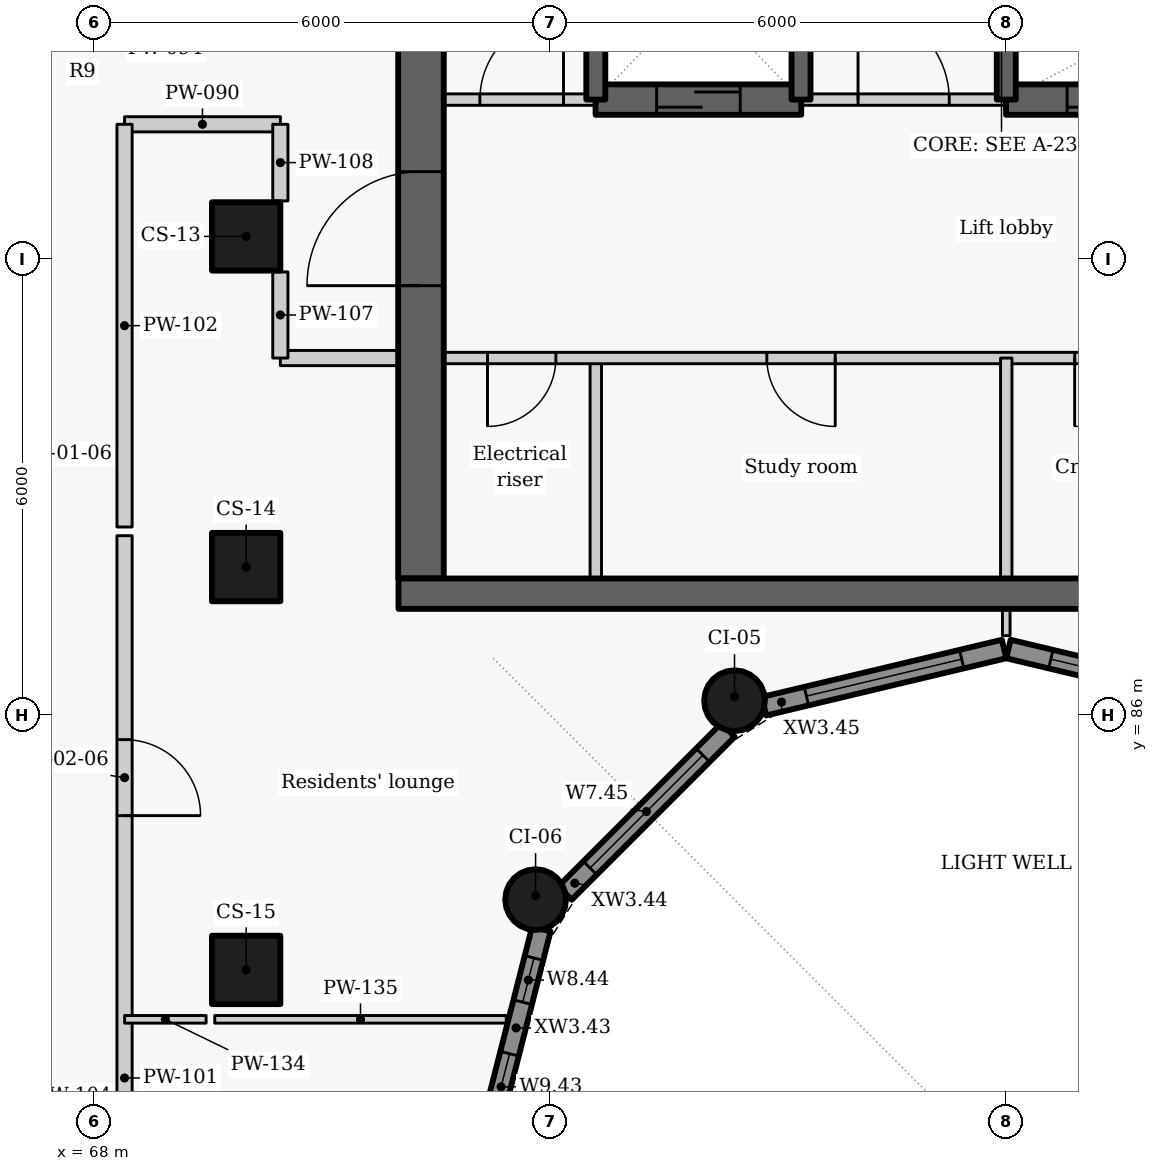
"""IFC4 building model, lengths in metres.
Left out: names, types, materials, properties, quantities, classifications, styles, units other than length and angle.
Written with IfcOpenShell. Run it as: python <this file> out.ifc"""

import sys

from ifc_helpers import new_model, si_unit, direction, frame, frame_2d, origin, origin_2d, place, context, subcontext, project, spatial, rectangle, circle, extrude, element, fill, save


model = new_model("IFC4")
c1 = context("Model", 3, precision=1e-05, world=origin(), true_north=direction((0.0, 1.0)))
c2 = subcontext(c1, "Body", "Model", "MODEL_VIEW")
j1 = project(units=[si_unit("LENGTHUNIT", "METRE"), si_unit("PLANEANGLEUNIT", "RADIAN")], contexts=[c1])
p1 = place(None, origin())
s1 = spatial("IfcSite", under=j1, at=p1, CompositionType="ELEMENT")
p2 = place(p1, origin())
s2 = spatial("IfcBuilding", under=s1, at=p2, CompositionType="ELEMENT")
p3 = place(p2, frame((0.0, 0.0, 176.7)))
s3 = spatial("IfcBuildingStorey", under=s2, at=p3, CompositionType="ELEMENT", Elevation=176.7)
for number, where, z_axis, x_axis in (
    (1, (70.0, 92.3, 0.0), (0.0, 0.0, 1.0), (0.0, -1.0, 0.0)),
    (2, (70.0, 87.95, 0.0), (0.0, 0.0, 1.0), (0.0, -1.0, 0.0)),
    (3, (70.0, 82.65, 0.0), (0.0, 0.0, 1.0), (0.0, -1.0, 0.0)),
):
    element("IfcColumn", number, at=place(p3, frame(where, z_axis=z_axis, x_axis=x_axis)), inside=s3, PredefinedType="COLUMN", context=c2, shape_type="SweptSolid", body=[
        extrude(rectangle(XDim=0.9, YDim=0.9, at=origin_2d()), origin(), (0.0, 0.0, 1.0), 3.3),
    ])
for number, where, z_axis, x_axis in (
    (4, (76.425, 86.192, 0.0), (0.0, 0.0, 1.0), (-0.866, -0.5, 0.0)),
    (5, (73.808, 83.575, 0.0), (0.0, 0.0, 1.0), (-0.5, -0.866, 0.0)),
):
    element("IfcColumn", number, at=place(p3, frame(where, z_axis=z_axis, x_axis=x_axis)), inside=s3, PredefinedType="COLUMN", context=c2, shape_type="SweptSolid", body=[
        extrude(circle(Radius=0.4, at=origin_2d()), origin(), (0.0, 0.0, 1.0), 3.3),
    ])
p4 = place(p3, frame((73.14, 80.27, 0.0), z_axis=(0.0, 0.0, 1.0), x_axis=(0.247055971283, 0.969001211069, 0.0)))
e6 = element("IfcWall", 6, at=p4, inside=s3, PredefinedType="SOLIDWALL", context=c2, shape_type="SweptSolid", body=[
    extrude(rectangle(XDim=3.01, YDim=0.25, at=frame_2d((1.505, 0.0))), origin(), (0.0, 0.0, 1.0), 2.425),
])
p5 = place(p4, frame((0.419, 0.0, 0.9)))
e7 = element("IfcOpeningElement", 7, at=p5, cuts=e6, PredefinedType="OPENING", context=c2, shape_type="SweptSolid", body=[
    extrude(rectangle(XDim=0.9, YDim=1.1, at=frame_2d((0.45, 0.55))), frame((0.0, 0.135, 0.0), z_axis=(0.0, -1.0, 0.0), x_axis=(1.0, 0.0, 0.0)), (0.0, 0.0, 1.0), 0.27),
])
p6 = place(p4, frame((2.018, 0.0, 0.9)))
e8 = element("IfcOpeningElement", 8, at=p6, cuts=e6, PredefinedType="OPENING", context=c2, shape_type="SweptSolid", body=[
    extrude(rectangle(XDim=0.6, YDim=1.1, at=frame_2d((0.3, 0.55))), frame((0.0, 0.135, 0.0), z_axis=(0.0, -1.0, 0.0), x_axis=(1.0, 0.0, 0.0)), (0.0, 0.0, 1.0), 0.27),
])
p7 = place(p3, frame((74.194, 83.661, 0.0), z_axis=(0.0, 0.0, 1.0), x_axis=(0.707106781187, 0.707106781187, 0.0)))
e9 = element("IfcWall", 9, at=p7, inside=s3, PredefinedType="SOLIDWALL", context=c2, shape_type="SweptSolid", body=[
    extrude(rectangle(XDim=3.033, YDim=0.25, at=frame_2d((1.517, 0.0))), origin(), (0.0, 0.0, 1.0), 2.425),
])
p8 = place(p7, frame((0.467, 0.0, 0.9)))
e10 = element("IfcOpeningElement", 10, at=p8, cuts=e9, PredefinedType="OPENING", context=c2, shape_type="SweptSolid", body=[
    extrude(rectangle(XDim=2.1, YDim=1.1, at=frame_2d((1.05, 0.55))), frame((0.0, 0.135, 0.0), z_axis=(0.0, -1.0, 0.0), x_axis=(1.0, 0.0, 0.0)), (0.0, 0.0, 1.0), 0.27),
])
p9 = place(p3, frame((76.814, 86.119, 0.0), z_axis=(0.0, 0.0, 1.0), x_axis=(0.972773113459, 0.231759508395, 0.0)))
e11 = element("IfcWall", 11, at=p9, inside=s3, PredefinedType="SOLIDWALL", context=c2, shape_type="SweptSolid", body=[
    extrude(rectangle(XDim=3.246, YDim=0.25, at=frame_2d((1.623, 0.0))), origin(), (0.0, 0.0, 1.0), 2.425),
])
p10 = place(p9, frame((0.573, 0.0, 0.9)))
e12 = element("IfcOpeningElement", 12, at=p10, cuts=e11, PredefinedType="OPENING", context=c2, shape_type="SweptSolid", body=[
    extrude(rectangle(XDim=2.1, YDim=1.1, at=frame_2d((1.05, 0.55))), frame((0.0, 0.135, 0.0), z_axis=(0.0, -1.0, 0.0), x_axis=(1.0, 0.0, 0.0)), (0.0, 0.0, 1.0), 0.27),
])
p11 = place(p3, frame((80.029, 86.872, 0.0), z_axis=(0.0, 0.0, 1.0), x_axis=(0.972773113459, -0.231759508395, 0.0)))
e13 = element("IfcWall", 13, at=p11, inside=s3, PredefinedType="SOLIDWALL", context=c2, shape_type="SweptSolid", body=[
    extrude(rectangle(XDim=3.246, YDim=0.25, at=frame_2d((1.623, 0.0))), origin(), (0.0, 0.0, 1.0), 2.425),
])
p12 = place(p11, frame((0.573, 0.0, 0.9)))
e14 = element("IfcOpeningElement", 14, at=p12, cuts=e13, PredefinedType="OPENING", context=c2, shape_type="SweptSolid", body=[
    extrude(rectangle(XDim=2.1, YDim=1.1, at=frame_2d((1.05, 0.55))), frame((0.0, 0.135, 0.0), z_axis=(0.0, -1.0, 0.0), x_axis=(1.0, 0.0, 0.0)), (0.0, 0.0, 1.0), 0.27),
])
p13 = place(p3, frame((74.6, 87.8, 0.0), z_axis=(0.0, 0.0, 1.0), x_axis=(0.0, 1.0, 0.0)))
e15 = element("IfcWall", 15, at=p13, inside=s3, PredefinedType="PARTITIONING", context=c2, shape_type="SweptSolid", body=[
    extrude(rectangle(XDim=2.9, YDim=0.15, at=frame_2d((1.45, 0.0))), origin(), (0.0, 0.0, 1.0), 3.025),
])
p14 = place(p3, frame((85.4, 90.7, 0.0), z_axis=(0.0, 0.0, 1.0), x_axis=(-1.0, 0.0, 0.0)))
e16 = element("IfcWall", 16, at=p14, inside=s3, PredefinedType="PARTITIONING", context=c2, shape_type="SweptSolid", body=[
    extrude(rectangle(XDim=13.4, YDim=0.15, at=frame_2d((6.7, 0.0))), origin(), (0.0, 0.0, 1.0), 3.025),
])
p15 = place(p14, frame((11.325, 0.0, 0.0)))
e17 = element("IfcOpeningElement", 17, at=p15, cuts=e16, PredefinedType="OPENING", context=c2, shape_type="SweptSolid", body=[
    extrude(rectangle(XDim=0.9, YDim=2.1, at=frame_2d((0.45, 1.05))), frame((0.0, 0.085, 0.0), z_axis=(0.0, -1.0, 0.0), x_axis=(1.0, 0.0, 0.0)), (0.0, 0.0, 1.0), 0.17),
])
p16 = place(p14, frame((7.65, 0.0, 0.0)))
e18 = element("IfcOpeningElement", 18, at=p16, cuts=e16, PredefinedType="OPENING", context=c2, shape_type="SweptSolid", body=[
    extrude(rectangle(XDim=0.9, YDim=2.1, at=frame_2d((0.45, 1.05))), frame((0.0, 0.085, 0.0), z_axis=(0.0, -1.0, 0.0), x_axis=(1.0, 0.0, 0.0)), (0.0, 0.0, 1.0), 0.17),
])
p17 = place(p14, frame((3.6, 0.0, 0.0)))
e19 = element("IfcOpeningElement", 19, at=p17, cuts=e16, PredefinedType="OPENING", context=c2, shape_type="SweptSolid", body=[
    extrude(rectangle(XDim=0.9, YDim=2.1, at=frame_2d((0.45, 1.05))), frame((0.0, 0.085, 0.0), z_axis=(0.0, -1.0, 0.0), x_axis=(1.0, 0.0, 0.0)), (0.0, 0.0, 1.0), 0.17),
])
p18 = place(p14, frame((0.9, 0.0, 0.0)))
e20 = element("IfcOpeningElement", 20, at=p18, cuts=e16, PredefinedType="OPENING", context=c2, shape_type="SweptSolid", body=[
    extrude(rectangle(XDim=0.9, YDim=2.1, at=frame_2d((0.45, 1.05))), frame((0.0, 0.085, 0.0), z_axis=(0.0, -1.0, 0.0), x_axis=(1.0, 0.0, 0.0)), (0.0, 0.0, 1.0), 0.17),
])
p19 = place(p3, frame((72.3, 87.8, -0.41), z_axis=(0.0, 0.0, 1.0), x_axis=(0.0, 1.0, 0.0)))
e21 = element("IfcWall", 21, at=p19, inside=s3, PredefinedType="SHEAR", context=c2, shape_type="SweptSolid", body=[
    extrude(rectangle(XDim=9.1, YDim=0.6, at=frame_2d((4.55, 0.0))), origin(), (0.0, 0.0, 1.0), 3.435),
])
p20 = place(p19, frame((3.852, 0.0, 0.41)))
e22 = element("IfcOpeningElement", 22, at=p20, cuts=e21, PredefinedType="OPENING", context=c2, shape_type="SweptSolid", body=[
    extrude(rectangle(XDim=1.5, YDim=2.1, at=frame_2d((0.75, 1.05))), frame((0.0, 0.31, 0.0), z_axis=(0.0, -1.0, 0.0), x_axis=(1.0, 0.0, 0.0)), (0.0, 0.0, 1.0), 0.62),
])
p21 = place(p3, frame((80.0, 87.8, 0.0), z_axis=(0.0, 0.0, 1.0), x_axis=(0.0, 1.0, 0.0)))
e23 = element("IfcWall", 23, at=p21, inside=s3, PredefinedType="PARTITIONING", context=c2, shape_type="SweptSolid", body=[
    extrude(rectangle(XDim=2.9, YDim=0.15, at=frame_2d((1.45, 0.0))), origin(), (0.0, 0.0, 1.0), 3.025),
])
p22 = place(p3, frame((72.0, 94.1, 0.0), z_axis=(0.0, 0.0, 1.0), x_axis=(1.0, 0.0, 0.0)))
e24 = element("IfcWall", 24, at=p22, inside=s3, PredefinedType="PARTITIONING", context=c2, shape_type="SweptSolid", body=[
    extrude(rectangle(XDim=2.603, YDim=0.15, at=frame_2d((1.302, 0.0))), origin(), (0.0, 0.0, 1.0), 3.025),
])
p23 = place(p22, frame((1.075, 0.0, 0.0)))
e25 = element("IfcOpeningElement", 25, at=p23, cuts=e24, PredefinedType="OPENING", context=c2, shape_type="SweptSolid", body=[
    extrude(rectangle(XDim=1.1, YDim=2.1, at=frame_2d((0.55, 1.05))), frame((0.0, 0.085, 0.0), z_axis=(0.0, -1.0, 0.0), x_axis=(1.0, 0.0, 0.0)), (0.0, 0.0, 1.0), 0.17),
])
p24 = place(p3, frame((77.297, 94.1, 0.0), z_axis=(0.0, 0.0, 1.0), x_axis=(1.0, 0.0, 0.0)))
e26 = element("IfcWall", 26, at=p24, inside=s3, PredefinedType="PARTITIONING", context=c2, shape_type="SweptSolid", body=[
    extrude(rectangle(XDim=2.706, YDim=0.15, at=frame_2d((1.353, 0.0))), origin(), (0.0, 0.0, 1.0), 3.025),
])
p25 = place(p24, frame((0.753, 0.0, 0.0)))
e27 = element("IfcOpeningElement", 27, at=p25, cuts=e26, PredefinedType="OPENING", context=c2, shape_type="SweptSolid", body=[
    extrude(rectangle(XDim=1.2, YDim=2.1, at=frame_2d((0.6, 1.05))), frame((0.0, 0.085, 0.0), z_axis=(0.0, -1.0, 0.0), x_axis=(1.0, 0.0, 0.0)), (0.0, 0.0, 1.0), 0.17),
])
p26 = place(p3, frame((74.597, 94.1, -0.41), z_axis=(0.0, 0.0, 1.0), x_axis=(1.0, 0.0, 0.0)))
e28 = element("IfcWall", 28, at=p26, inside=s3, PredefinedType="SHEAR", context=c2, shape_type="SweptSolid", body=[
    extrude(rectangle(XDim=2.706, YDim=0.4, at=frame_2d((1.353, 0.0))), origin(), (0.0, 0.0, 1.0), 3.435),
])
p27 = place(p26, frame((0.803, 0.0, 0.41)))
e29 = element("IfcOpeningElement", 29, at=p27, cuts=e28, PredefinedType="OPENING", context=c2, shape_type="SweptSolid", body=[
    extrude(rectangle(XDim=1.1, YDim=2.1, at=frame_2d((0.55, 1.05))), frame((0.0, 0.21, 0.0), z_axis=(0.0, -1.0, 0.0), x_axis=(1.0, 0.0, 0.0)), (0.0, 0.0, 1.0), 0.42),
])
p28 = place(p3, frame((79.997, 94.1, -0.41), z_axis=(0.0, 0.0, 1.0), x_axis=(1.0, 0.0, 0.0)))
e30 = element("IfcWall", 30, at=p28, inside=s3, PredefinedType="SHEAR", context=c2, shape_type="SweptSolid", body=[
    extrude(rectangle(XDim=5.406, YDim=0.4, at=frame_2d((2.703, 0.0))), origin(), (0.0, 0.0, 1.0), 3.435),
])
p29 = place(p28, frame((0.803, 0.0, 0.41)))
e31 = element("IfcOpeningElement", 31, at=p29, cuts=e30, PredefinedType="OPENING", context=c2, shape_type="SweptSolid", body=[
    extrude(rectangle(XDim=1.1, YDim=2.1, at=frame_2d((0.55, 1.05))), frame((0.0, 0.21, 0.0), z_axis=(0.0, -1.0, 0.0), x_axis=(1.0, 0.0, 0.0)), (0.0, 0.0, 1.0), 0.42),
])
for number, where, z_axis, x_axis in (
    (32, (74.6, 94.1, -0.41), (0.0, 0.0, 1.0), (0.0, 1.0, 0.0)),
    (33, (77.3, 94.1, -0.41), (0.0, 0.0, 1.0), (0.0, 1.0, 0.0)),
    (34, (80.0, 94.1, -0.41), (0.0, 0.0, 1.0), (0.0, 1.0, 0.0)),
):
    element("IfcWall", number, at=place(p3, frame(where, z_axis=z_axis, x_axis=x_axis)), inside=s3, PredefinedType="SHEAR", context=c2, shape_type="SweptSolid", body=[
        extrude(rectangle(XDim=2.8, YDim=0.25, at=frame_2d((1.4, 0.0))), origin(), (0.0, 0.0, 1.0), 3.435),
    ])
p30 = place(p3, frame((68.4, 93.775, 0.0), z_axis=(0.0, 0.0, 1.0), x_axis=(1.0, 0.0, 0.0)))
e35 = element("IfcWall", 35, at=p30, inside=s3, PredefinedType="PARTITIONING", context=c2, shape_type="SweptSolid", body=[
    extrude(rectangle(XDim=2.05, YDim=0.2, at=frame_2d((1.025, 0.0))), origin(), (0.0, 0.0, 1.0), 2.505),
])
p31 = place(p3, frame((70.45, 90.7, 0.0), z_axis=(0.0, 0.0, 1.0), x_axis=(1.0, 0.0, 0.0)))
e36 = element("IfcWall", 36, at=p31, inside=s3, PredefinedType="PARTITIONING", context=c2, shape_type="SweptSolid", body=[
    extrude(rectangle(XDim=1.55, YDim=0.2, at=frame_2d((0.775, 0.0))), origin(), (0.0, 0.0, 1.0), 3.025),
])
p32 = place(p3, frame((68.4, 88.363, 0.0), z_axis=(0.0, 0.0, 1.0), x_axis=(0.0, -1.0, 0.0)))
e37 = element("IfcWall", 37, at=p32, inside=s3, PredefinedType="PARTITIONING", context=c2, shape_type="SweptSolid", body=[
    extrude(rectangle(XDim=10.486, YDim=0.2, at=frame_2d((5.243, 0.0))), origin(), (0.0, 0.0, 1.0), 3.025),
])
p33 = place(p32, frame((2.683, 0.0, 0.0)))
e38 = element("IfcOpeningElement", 38, at=p33, cuts=e37, PredefinedType="OPENING", context=c2, shape_type="SweptSolid", body=[
    extrude(rectangle(XDim=1.0, YDim=2.1, at=frame_2d((0.5, 1.05))), frame((0.0, 0.11, 0.0), z_axis=(0.0, -1.0, 0.0), x_axis=(1.0, 0.0, 0.0)), (0.0, 0.0, 1.0), 0.22),
])
p34 = place(p3, frame((68.4, 88.477, 0.0), z_axis=(0.0, 0.0, 1.0), x_axis=(0.0, 1.0, 0.0)))
e39 = element("IfcWall", 39, at=p34, inside=s3, PredefinedType="PARTITIONING", context=c2, shape_type="SweptSolid", body=[
    extrude(rectangle(XDim=5.298, YDim=0.2, at=frame_2d((2.649, 0.0))), origin(), (0.0, 0.0, 1.0), 3.025),
])
p35 = place(p3, frame((70.45, 90.7, 0.0), z_axis=(0.0, 0.0, 1.0), x_axis=(0.0, 1.0, 0.0)))
e40 = element("IfcWall", 40, at=p35, inside=s3, PredefinedType="PARTITIONING", context=c2, shape_type="SweptSolid", body=[
    extrude(rectangle(XDim=1.133, YDim=0.2, at=frame_2d((0.566, 0.0))), origin(), (0.0, 0.0, 1.0), 3.025),
])
p36 = place(p3, frame((70.45, 92.767, 0.0), z_axis=(0.0, 0.0, 1.0), x_axis=(0.0, 1.0, 0.0)))
e41 = element("IfcWall", 41, at=p36, inside=s3, PredefinedType="PARTITIONING", context=c2, shape_type="SweptSolid", body=[
    extrude(rectangle(XDim=1.008, YDim=0.2, at=frame_2d((0.504, 0.0))), origin(), (0.0, 0.0, 1.0), 3.025),
])
p37 = place(p3, frame((80.0, 87.048, 0.0), z_axis=(0.0, 0.0, 1.0), x_axis=(0.0, 1.0, 0.0)))
e42 = element("IfcWall", 42, at=p37, inside=s3, PredefinedType="PARTITIONING", context=c2, shape_type="SweptSolid", body=[
    extrude(rectangle(XDim=0.352, YDim=0.1, at=frame_2d((0.176, 0.0))), origin(), (0.0, 0.0, 1.0), 3.025),
])
p38 = place(p3, frame((68.401, 82.0, 0.0), z_axis=(0.0, 0.0, 1.0), x_axis=(1.0, 0.0, 0.0)))
e43 = element("IfcWall", 43, at=p38, inside=s3, PredefinedType="PARTITIONING", context=c2, shape_type="SweptSolid", body=[
    extrude(rectangle(XDim=1.072, YDim=0.1, at=frame_2d((0.536, 0.0))), origin(), (0.0, 0.0, 1.0), 3.025),
])
p39 = place(p3, frame((69.587, 82.0, 0.0), z_axis=(0.0, 0.0, 1.0), x_axis=(1.0, 0.0, 0.0)))
e44 = element("IfcWall", 44, at=p39, inside=s3, PredefinedType="PARTITIONING", context=c2, shape_type="SweptSolid", body=[
    extrude(rectangle(XDim=3.835, YDim=0.1, at=frame_2d((1.917, 0.0))), origin(), (0.0, 0.0, 1.0), 2.505),
])
p40 = place(p3, frame((72.004, 87.6, -0.41), z_axis=(0.0, 0.0, 1.0), x_axis=(1.0, 0.0, 0.0)))
e45 = element("IfcWall", 45, at=p40, inside=s3, PredefinedType="SHEAR", context=c2, shape_type="SweptSolid", body=[
    extrude(rectangle(XDim=15.992, YDim=0.4, at=frame_2d((7.996, 0.0))), origin(), (0.0, 0.0, 1.0), 3.435),
])
p41 = place(p5, origin())
e46 = element("IfcWindow", 46, at=p41, inside=s3, PartitioningType="SINGLE_PANEL", PredefinedType="WINDOW", context=c2, shape_type="SweptSolid", body=[
    extrude(rectangle(XDim=0.9, YDim=1.1, at=frame_2d((0.45, 0.55))), frame((0.0, 0.03, 0.0), z_axis=(0.0, -1.0, 0.0), x_axis=(1.0, 0.0, 0.0)), (0.0, 0.0, 1.0), 0.06),
])
fill(e7, e46)
p42 = place(p6, origin())
e47 = element("IfcWindow", 47, at=p42, inside=s3, PartitioningType="SINGLE_PANEL", PredefinedType="WINDOW", context=c2, shape_type="SweptSolid", body=[
    extrude(rectangle(XDim=0.6, YDim=1.1, at=frame_2d((0.3, 0.55))), frame((0.0, 0.03, 0.0), z_axis=(0.0, -1.0, 0.0), x_axis=(1.0, 0.0, 0.0)), (0.0, 0.0, 1.0), 0.06),
])
fill(e8, e47)
p43 = place(p8, origin())
e48 = element("IfcWindow", 48, at=p43, inside=s3, PartitioningType="SINGLE_PANEL", PredefinedType="WINDOW", context=c2, shape_type="SweptSolid", body=[
    extrude(rectangle(XDim=2.1, YDim=1.1, at=frame_2d((1.05, 0.55))), frame((0.0, 0.03, 0.0), z_axis=(0.0, -1.0, 0.0), x_axis=(1.0, 0.0, 0.0)), (0.0, 0.0, 1.0), 0.06),
])
fill(e10, e48)
p44 = place(p10, origin())
e49 = element("IfcWindow", 49, at=p44, inside=s3, PartitioningType="SINGLE_PANEL", PredefinedType="WINDOW", context=c2, shape_type="SweptSolid", body=[
    extrude(rectangle(XDim=2.1, YDim=1.1, at=frame_2d((1.05, 0.55))), frame((0.0, 0.03, 0.0), z_axis=(0.0, -1.0, 0.0), x_axis=(1.0, 0.0, 0.0)), (0.0, 0.0, 1.0), 0.06),
])
fill(e12, e49)
p45 = place(p12, origin())
e50 = element("IfcWindow", 50, at=p45, inside=s3, PartitioningType="SINGLE_PANEL", PredefinedType="WINDOW", context=c2, shape_type="SweptSolid", body=[
    extrude(rectangle(XDim=2.1, YDim=1.1, at=frame_2d((1.05, 0.55))), frame((0.0, 0.03, 0.0), z_axis=(0.0, -1.0, 0.0), x_axis=(1.0, 0.0, 0.0)), (0.0, 0.0, 1.0), 0.06),
])
fill(e14, e50)
p46 = place(p15, origin())
e51 = element("IfcDoor", 51, at=p46, inside=s3, OperationType="SINGLE_SWING_RIGHT", PredefinedType="DOOR", context=c2, shape_type="SweptSolid", body=[
    extrude(rectangle(XDim=0.9, YDim=2.1, at=frame_2d((0.45, 1.05))), frame((0.0, 0.025, 0.0), z_axis=(0.0, -1.0, 0.0), x_axis=(1.0, 0.0, 0.0)), (0.0, 0.0, 1.0), 0.05),
])
fill(e17, e51)
p47 = place(p16, origin())
e52 = element("IfcDoor", 52, at=p47, inside=s3, OperationType="SINGLE_SWING_LEFT", PredefinedType="DOOR", context=c2, shape_type="SweptSolid", body=[
    extrude(rectangle(XDim=0.9, YDim=2.1, at=frame_2d((0.45, 1.05))), frame((0.0, 0.025, 0.0), z_axis=(0.0, -1.0, 0.0), x_axis=(1.0, 0.0, 0.0)), (0.0, 0.0, 1.0), 0.05),
])
fill(e18, e52)
p48 = place(p17, origin())
e53 = element("IfcDoor", 53, at=p48, inside=s3, OperationType="SINGLE_SWING_RIGHT", PredefinedType="DOOR", context=c2, shape_type="SweptSolid", body=[
    extrude(rectangle(XDim=0.9, YDim=2.1, at=frame_2d((0.45, 1.05))), frame((0.0, 0.025, 0.0), z_axis=(0.0, -1.0, 0.0), x_axis=(1.0, 0.0, 0.0)), (0.0, 0.0, 1.0), 0.05),
])
fill(e19, e53)
p49 = place(p23, origin())
e54 = element("IfcDoor", 54, at=p49, inside=s3, OperationType="SINGLE_SWING_RIGHT", PredefinedType="DOOR", context=c2, shape_type="SweptSolid", body=[
    extrude(rectangle(XDim=1.1, YDim=2.1, at=frame_2d((0.55, 1.05))), frame((0.0, 0.025, 0.0), z_axis=(0.0, -1.0, 0.0), x_axis=(1.0, 0.0, 0.0)), (0.0, 0.0, 1.0), 0.05),
])
fill(e25, e54)
p50 = place(p27, origin())
e55 = element("IfcDoor", 55, at=p50, inside=s3, OperationType="SLIDING_TO_LEFT", PredefinedType="DOOR", context=c2, shape_type="SweptSolid", body=[
    extrude(rectangle(XDim=1.1, YDim=2.1, at=frame_2d((0.55, 1.05))), frame((0.0, 0.025, 0.0), z_axis=(0.0, -1.0, 0.0), x_axis=(1.0, 0.0, 0.0)), (0.0, 0.0, 1.0), 0.05),
])
fill(e29, e55)
p51 = place(p25, origin())
e56 = element("IfcDoor", 56, at=p51, inside=s3, OperationType="DOUBLE_DOOR_SINGLE_SWING", PredefinedType="DOOR", context=c2, shape_type="SweptSolid", body=[
    extrude(rectangle(XDim=1.2, YDim=2.1, at=frame_2d((0.6, 1.05))), frame((0.0, 0.025, 0.0), z_axis=(0.0, -1.0, 0.0), x_axis=(1.0, 0.0, 0.0)), (0.0, 0.0, 1.0), 0.05),
])
fill(e27, e56)
p52 = place(p29, origin())
e57 = element("IfcDoor", 57, at=p52, inside=s3, OperationType="SLIDING_TO_LEFT", PredefinedType="DOOR", context=c2, shape_type="SweptSolid", body=[
    extrude(rectangle(XDim=1.1, YDim=2.1, at=frame_2d((0.55, 1.05))), frame((0.0, 0.025, 0.0), z_axis=(0.0, -1.0, 0.0), x_axis=(1.0, 0.0, 0.0)), (0.0, 0.0, 1.0), 0.05),
])
fill(e31, e57)
p53 = place(p33, origin())
e58 = element("IfcDoor", 58, at=p53, inside=s3, OperationType="SINGLE_SWING_RIGHT", PredefinedType="DOOR", context=c2, shape_type="SweptSolid", body=[
    extrude(rectangle(XDim=1.0, YDim=2.1, at=frame_2d((0.5, 1.05))), frame((0.0, 0.025, 0.0), z_axis=(0.0, -1.0, 0.0), x_axis=(1.0, 0.0, 0.0)), (0.0, 0.0, 1.0), 0.05),
])
fill(e38, e58)
p54 = place(p20, origin())
e59 = element("IfcDoor", 59, at=p54, inside=s3, OperationType="DOUBLE_DOOR_SINGLE_SWING", PredefinedType="DOOR", context=c2, shape_type="SweptSolid", body=[
    extrude(rectangle(XDim=1.5, YDim=2.1, at=frame_2d((0.75, 1.05))), frame((0.0, 0.025, 0.0), z_axis=(0.0, -1.0, 0.0), x_axis=(1.0, 0.0, 0.0)), (0.0, 0.0, 1.0), 0.05),
])
fill(e22, e59)
save(model, sys.argv[1])
